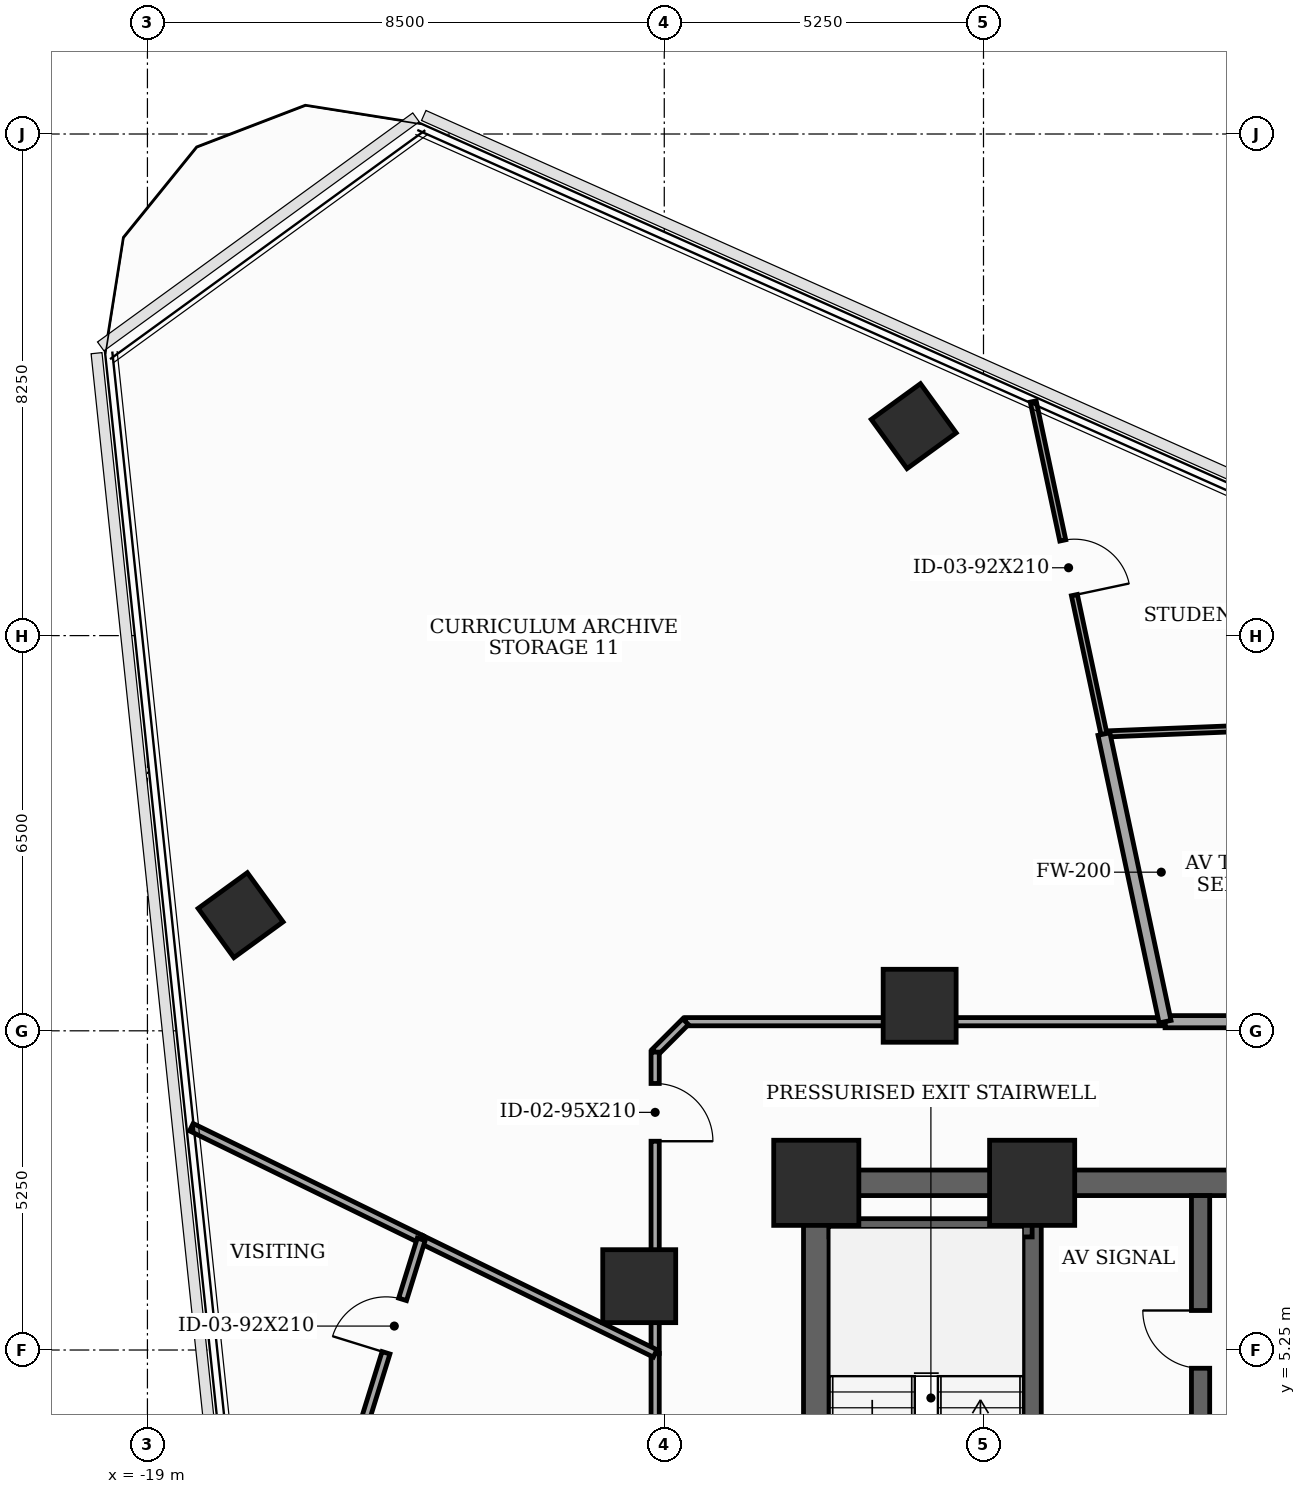
"""IFC4 building model, lengths in metres.
Left out: names, types, materials, properties, quantities, classifications, styles, units other than length and angle.
Written with IfcOpenShell. Run it as: python <this file> out.ifc"""

import sys

from ifc_helpers import new_model, si_unit, direction, frame, frame_2d, origin, origin_2d, place, context, subcontext, project, spatial, rectangle, extrude, element, fill, save


model = new_model("IFC4")
c1 = context("Model", 3, precision=1e-05, world=origin(), true_north=direction((0.0, 1.0)))
c2 = subcontext(c1, "Body", "Model", "MODEL_VIEW")
j1 = project(units=[si_unit("LENGTHUNIT", "METRE"), si_unit("PLANEANGLEUNIT", "RADIAN")], contexts=[c1])
p1 = place(None, origin())
s1 = spatial("IfcSite", under=j1, at=p1, CompositionType="ELEMENT")
p2 = place(p1, origin())
s2 = spatial("IfcBuilding", under=s1, at=p2, CompositionType="ELEMENT")
p3 = place(p2, frame((0.0, 0.0, 173.1)))
s3 = spatial("IfcBuildingStorey", under=s2, at=p3, CompositionType="ELEMENT", Elevation=173.1)
for number, where, z_axis, x_axis in (
    (1, (-4.45, 8.0, 0.0), (0.0, 0.0, 1.0), (1.0, 0.0, 0.0)),
    (2, (-8.0, 8.0, 0.0), (0.0, 0.0, 1.0), (1.0, 0.0, 0.0)),
):
    element("IfcColumn", number, at=place(p3, frame(where, z_axis=z_axis, x_axis=x_axis)), inside=s3, PredefinedType="COLUMN", context=c2, shape_type="SweptSolid", body=[
        extrude(rectangle(XDim=1.4, YDim=1.4, at=origin_2d()), origin(), (0.0, 0.0, 1.0), 3.7),
    ])
for number, where, z_axis, x_axis in (
    (3, (-6.3, 10.912, 0.0), (0.0, 0.0, 1.0), (1.0, 0.0, 0.0)),
    (4, (-10.912, 6.3, 0.0), (0.0, 0.0, 1.0), (1.0, 0.0, 0.0)),
):
    element("IfcColumn", number, at=place(p3, frame(where, z_axis=z_axis, x_axis=x_axis)), inside=s3, PredefinedType="COLUMN", context=c2, shape_type="SweptSolid", body=[
        extrude(rectangle(XDim=1.2, YDim=1.2, at=origin_2d()), origin(), (0.0, 0.0, 1.0), 3.7),
    ])
for number, where, z_axis, x_axis in (
    (5, (-6.397, 20.445, 0.0), (0.0, 0.0, 1.0), (0.809, 0.588, 0.0)),
    (6, (-17.468, 12.402, 0.0), (0.0, 0.0, 1.0), (0.809, 0.588, 0.0)),
):
    element("IfcColumn", number, at=place(p3, frame(where, z_axis=z_axis, x_axis=x_axis)), inside=s3, PredefinedType="COLUMN", context=c2, shape_type="SweptSolid", body=[
        extrude(rectangle(XDim=1.0, YDim=1.0, at=origin_2d()), origin(), (0.0, 0.0, 1.0), 3.7),
    ])
p4 = place(p3, frame((-8.0, -8.0, 0.0), z_axis=(0.0, 0.0, 1.0), x_axis=(0.0, 1.0, 0.0)))
e7 = element("IfcWall", 7, at=p4, inside=s3, PredefinedType="SHEAR", context=c2, shape_type="SweptSolid", body=[
    extrude(rectangle(XDim=16.0, YDim=0.42, at=frame_2d((8.0, 0.0))), origin(), (0.0, 0.0, 1.0), 3.5),
])
p5 = place(p4, frame((0.922, 0.0, 0.0)))
e8 = element("IfcOpeningElement", 8, at=p5, cuts=e7, PredefinedType="OPENING", context=c2, shape_type="SweptSolid", body=[
    extrude(rectangle(XDim=0.85, YDim=2.02, at=frame_2d((0.425, 1.01))), frame((0.0, 0.22, 0.0), z_axis=(0.0, -1.0, 0.0), x_axis=(1.0, 0.0, 0.0)), (0.0, 0.0, 1.0), 0.44),
])
p6 = place(p4, frame((5.35, 0.0, 0.0)))
e9 = element("IfcOpeningElement", 9, at=p6, cuts=e7, PredefinedType="OPENING", context=c2, shape_type="SweptSolid", body=[
    extrude(rectangle(XDim=1.05, YDim=2.15, at=frame_2d((0.525, 1.075))), frame((0.0, 0.22, 0.0), z_axis=(0.0, -1.0, 0.0), x_axis=(1.0, 0.0, 0.0)), (0.0, 0.0, 1.0), 0.44),
])
p7 = place(p3, frame((-8.0, 8.0, 0.0), z_axis=(0.0, 0.0, 1.0), x_axis=(1.0, 0.0, 0.0)))
e10 = element("IfcWall", 10, at=p7, inside=s3, PredefinedType="SHEAR", context=c2, shape_type="SweptSolid", body=[
    extrude(rectangle(XDim=16.0, YDim=0.42, at=frame_2d((8.0, 0.0))), origin(), (0.0, 0.0, 1.0), 3.5),
])
p8 = place(p7, frame((7.1, 0.0, 0.0)))
e11 = element("IfcOpeningElement", 11, at=p8, cuts=e10, PredefinedType="OPENING", context=c2, shape_type="SweptSolid", body=[
    extrude(rectangle(XDim=1.8, YDim=2.15, at=frame_2d((0.9, 1.075))), frame((0.0, 0.22, 0.0), z_axis=(0.0, -1.0, 0.0), x_axis=(1.0, 0.0, 0.0)), (0.0, 0.0, 1.0), 0.44),
])
p9 = place(p3, frame((-4.45, -7.79, 0.0), z_axis=(0.0, 0.0, 1.0), x_axis=(0.0, 1.0, 0.0)))
e12 = element("IfcWall", 12, at=p9, inside=s3, PredefinedType="SHEAR", context=c2, shape_type="SweptSolid", body=[
    extrude(rectangle(XDim=15.58, YDim=0.3, at=frame_2d((7.79, 0.0))), origin(), (0.0, 0.0, 1.0), 3.5),
])
p10 = place(p3, frame((-7.79, 7.26, 0.0), z_axis=(0.0, 0.0, 1.0), x_axis=(1.0, 0.0, 0.0)))
e13 = element("IfcWall", 13, at=p10, inside=s3, PredefinedType="SHEAR", context=c2, shape_type="SweptSolid", body=[
    extrude(rectangle(XDim=3.34, YDim=0.3, at=frame_2d((1.67, 0.0))), origin(), (0.0, 0.0, 1.0), 3.5),
])
p11 = place(p3, frame((-1.68, -4.85, 0.0), z_axis=(0.0, 0.0, 1.0), x_axis=(0.0, 1.0, 0.0)))
e14 = element("IfcWall", 14, at=p11, inside=s3, PredefinedType="SHEAR", context=c2, shape_type="SweptSolid", body=[
    extrude(rectangle(XDim=12.64, YDim=0.3, at=frame_2d((6.32, 0.0))), origin(), (0.0, 0.0, 1.0), 3.5),
])
p12 = place(p11, frame((3.5, 0.0, 0.0)))
e15 = element("IfcOpeningElement", 15, at=p12, cuts=e14, PredefinedType="OPENING", context=c2, shape_type="SweptSolid", body=[
    extrude(rectangle(XDim=0.95, YDim=2.1, at=frame_2d((0.475, 1.05))), frame((0.0, 0.16, 0.0), z_axis=(0.0, -1.0, 0.0), x_axis=(1.0, 0.0, 0.0)), (0.0, 0.0, 1.0), 0.32),
])
p13 = place(p11, frame((9.8, 0.0, 0.0)))
e16 = element("IfcOpeningElement", 16, at=p13, cuts=e14, PredefinedType="OPENING", context=c2, shape_type="SweptSolid", body=[
    extrude(rectangle(XDim=0.95, YDim=2.1, at=frame_2d((0.475, 1.05))), frame((0.0, 0.16, 0.0), z_axis=(0.0, -1.0, 0.0), x_axis=(1.0, 0.0, 0.0)), (0.0, 0.0, 1.0), 0.32),
])
p14 = place(p3, frame((10.15, 10.65, 0.0), z_axis=(0.0, 0.0, 1.0), x_axis=(-1.0, 0.0, 0.0)))
e17 = element("IfcWall", 17, at=p14, inside=s3, PredefinedType="SOLIDWALL", context=c2, shape_type="SweptSolid", body=[
    extrude(rectangle(XDim=12.414, YDim=0.2, at=frame_2d((6.207, 0.0))), origin(), (0.0, 0.0, 1.0), 2.875),
])
p15 = place(p14, frame((7.222, 0.0, 0.0)))
e18 = element("IfcOpeningElement", 18, at=p15, cuts=e17, PredefinedType="OPENING", context=c2, shape_type="SweptSolid", body=[
    extrude(rectangle(XDim=0.95, YDim=2.1, at=frame_2d((0.475, 1.05))), frame((0.0, 0.11, 0.0), z_axis=(0.0, -1.0, 0.0), x_axis=(1.0, 0.0, 0.0)), (0.0, 0.0, 1.0), 0.22),
])
p16 = place(p3, frame((-2.264, 10.65, 0.0), z_axis=(0.0, 0.0, 1.0), x_axis=(-1.0, 0.0, 0.0)))
e19 = element("IfcWall", 19, at=p16, inside=s3, PredefinedType="PARTITIONING", context=c2, shape_type="SweptSolid", body=[
    extrude(rectangle(XDim=7.886, YDim=0.135, at=frame_2d((3.943, 0.0))), origin(), (0.0, 0.0, 1.0), 2.885),
])
p17 = place(p3, frame((-10.15, 10.65, 0.0), z_axis=(0.0, 0.0, 1.0), x_axis=(-0.707106781187, -0.707106781187, 0.0)))
e20 = element("IfcWall", 20, at=p17, inside=s3, PredefinedType="PARTITIONING", context=c2, shape_type="SweptSolid", body=[
    extrude(rectangle(XDim=0.707, YDim=0.135, at=frame_2d((0.354, 0.0))), origin(), (0.0, 0.0, 1.0), 3.5),
])
p18 = place(p3, frame((-10.65, 10.15, 0.0), z_axis=(0.0, 0.0, 1.0), x_axis=(0.0, -1.0, 0.0)))
e21 = element("IfcWall", 21, at=p18, inside=s3, PredefinedType="PARTITIONING", context=c2, shape_type="SweptSolid", body=[
    extrude(rectangle(XDim=4.956, YDim=0.135, at=frame_2d((2.478, 0.0))), origin(), (0.0, 0.0, 1.0), 2.885),
])
p19 = place(p18, frame((0.516, 0.0, 0.0)))
e22 = element("IfcOpeningElement", 22, at=p19, cuts=e21, PredefinedType="OPENING", context=c2, shape_type="SweptSolid", body=[
    extrude(rectangle(XDim=0.95, YDim=2.1, at=frame_2d((0.475, 1.05))), frame((0.0, 0.077, 0.0), z_axis=(0.0, -1.0, 0.0), x_axis=(1.0, 0.0, 0.0)), (0.0, 0.0, 1.0), 0.155),
])
p20 = place(p3, frame((-10.65, 5.194, 0.0), z_axis=(0.0, 0.0, 1.0), x_axis=(0.0, -1.0, 0.0)))
e23 = element("IfcWall", 23, at=p20, inside=s3, PredefinedType="PARTITIONING", context=c2, shape_type="SweptSolid", body=[
    extrude(rectangle(XDim=2.744, YDim=0.135, at=frame_2d((1.372, 0.0))), origin(), (0.0, 0.0, 1.0), 3.5),
])
p21 = place(p20, frame((1.226, 0.0, 0.0)))
e24 = element("IfcOpeningElement", 24, at=p21, cuts=e23, PredefinedType="OPENING", context=c2, shape_type="SweptSolid", body=[
    extrude(rectangle(XDim=0.95, YDim=2.1, at=frame_2d((0.475, 1.05))), frame((0.0, 0.077, 0.0), z_axis=(0.0, -1.0, 0.0), x_axis=(1.0, 0.0, 0.0)), (0.0, 0.0, 1.0), 0.155),
])
p22 = place(p3, frame((-3.269, 15.381, 0.0), z_axis=(0.0, 0.0, 1.0), x_axis=(0.999171753478, 0.040691609114, 0.0)))
e25 = element("IfcWall", 25, at=p22, inside=s3, PredefinedType="MOVABLE", context=c2, shape_type="SweptSolid", body=[
    extrude(rectangle(XDim=5.7, YDim=0.1, at=frame_2d((2.85, 0.0))), origin(), (0.0, 0.0, 1.0), 2.885),
])
p23 = place(p3, frame((-4.432, 20.851, 0.0), z_axis=(0.0, 0.0, 1.0), x_axis=(0.208032106743, -0.978121997792, 0.0)))
e26 = element("IfcWall", 26, at=p23, inside=s3, PredefinedType="MOVABLE", context=c2, shape_type="SweptSolid", body=[
    extrude(rectangle(XDim=5.592, YDim=0.1, at=frame_2d((2.796, 0.0))), origin(), (0.0, 0.0, 1.0), 2.985),
])
p24 = place(p23, frame((2.336, 0.0, 0.0)))
e27 = element("IfcOpeningElement", 27, at=p24, cuts=e26, PredefinedType="OPENING", context=c2, shape_type="SweptSolid", body=[
    extrude(rectangle(XDim=0.92, YDim=2.1, at=frame_2d((0.46, 1.05))), frame((0.0, 0.06, 0.0), z_axis=(0.0, -1.0, 0.0), x_axis=(1.0, 0.0, 0.0)), (0.0, 0.0, 1.0), 0.12),
])
p25 = place(p3, frame((-3.269, 15.381, 0.0), z_axis=(0.0, 0.0, 1.0), x_axis=(0.207808649559, -0.978169497157, 0.0)))
e28 = element("IfcWall", 28, at=p25, inside=s3, PredefinedType="SOLIDWALL", context=c2, shape_type="SweptSolid", body=[
    extrude(rectangle(XDim=4.837, YDim=0.2, at=frame_2d((2.418, 0.0))), origin(), (0.0, 0.0, 1.0), 2.885),
])
p26 = place(p3, frame((-18.277, 8.915, 0.0), z_axis=(0.0, 0.0, 1.0), x_axis=(0.898795221882, -0.43836873648, 0.0)))
e29 = element("IfcWall", 29, at=p26, inside=s3, PredefinedType="PARTITIONING", context=c2, shape_type="SweptSolid", body=[
    extrude(rectangle(XDim=4.206, YDim=0.135, at=frame_2d((2.103, 0.0))), origin(), (0.0, 0.0, 1.0), 2.985),
])
p27 = place(p3, frame((-14.497, 7.071, 0.0), z_axis=(0.0, 0.0, 1.0), x_axis=(0.89874213328, -0.438477568261, 0.0)))
e30 = element("IfcWall", 30, at=p27, inside=s3, PredefinedType="PARTITIONING", context=c2, shape_type="SweptSolid", body=[
    extrude(rectangle(XDim=4.281, YDim=0.135, at=frame_2d((2.14, 0.0))), origin(), (0.0, 0.0, 1.0), 2.885),
])
p28 = place(p3, frame((-16.079, 1.974, 0.0), z_axis=(0.0, 0.0, 1.0), x_axis=(0.296438064518, 0.955052079158, 0.0)))
e31 = element("IfcWall", 31, at=p28, inside=s3, PredefinedType="PARTITIONING", context=c2, shape_type="SweptSolid", body=[
    extrude(rectangle(XDim=5.337, YDim=0.135, at=frame_2d((2.668, 0.0))), origin(), (0.0, 0.0, 1.0), 2.885),
])
p29 = place(p28, frame((3.383, 0.0, 0.0)))
e32 = element("IfcOpeningElement", 32, at=p29, cuts=e31, PredefinedType="OPENING", context=c2, shape_type="SweptSolid", body=[
    extrude(rectangle(XDim=0.92, YDim=2.1, at=frame_2d((0.46, 1.05))), frame((0.0, 0.077, 0.0), z_axis=(0.0, -1.0, 0.0), x_axis=(1.0, 0.0, 0.0)), (0.0, 0.0, 1.0), 0.155),
])
p30 = place(p13, origin())
e33 = element("IfcDoor", 33, at=p30, inside=s3, OperationType="SINGLE_SWING_RIGHT", PredefinedType="DOOR", context=c2, shape_type="SweptSolid", body=[
    extrude(rectangle(XDim=0.95, YDim=2.1, at=frame_2d((0.475, 1.05))), frame((0.0, 0.025, 0.0), z_axis=(0.0, -1.0, 0.0), x_axis=(1.0, 0.0, 0.0)), (0.0, 0.0, 1.0), 0.05),
])
fill(e16, e33)
p31 = place(p19, origin())
e34 = element("IfcDoor", 34, at=p31, inside=s3, OperationType="SINGLE_SWING_RIGHT", PredefinedType="DOOR", context=c2, shape_type="SweptSolid", body=[
    extrude(rectangle(XDim=0.95, YDim=2.1, at=frame_2d((0.475, 1.05))), frame((0.0, 0.025, 0.0), z_axis=(0.0, -1.0, 0.0), x_axis=(1.0, 0.0, 0.0)), (0.0, 0.0, 1.0), 0.05),
])
fill(e22, e34)
p32 = place(p24, origin())
e35 = element("IfcDoor", 35, at=p32, inside=s3, OperationType="SINGLE_SWING_RIGHT", PredefinedType="DOOR", context=c2, shape_type="SweptSolid", body=[
    extrude(rectangle(XDim=0.92, YDim=2.1, at=frame_2d((0.46, 1.05))), frame((0.0, 0.025, 0.0), z_axis=(0.0, -1.0, 0.0), x_axis=(1.0, 0.0, 0.0)), (0.0, 0.0, 1.0), 0.05),
])
fill(e27, e35)
p33 = place(p29, origin())
e36 = element("IfcDoor", 36, at=p33, inside=s3, OperationType="SINGLE_SWING_LEFT", PredefinedType="DOOR", context=c2, shape_type="SweptSolid", body=[
    extrude(rectangle(XDim=0.92, YDim=2.1, at=frame_2d((0.46, 1.05))), frame((0.0, 0.025, 0.0), z_axis=(0.0, -1.0, 0.0), x_axis=(1.0, 0.0, 0.0)), (0.0, 0.0, 1.0), 0.05),
])
fill(e32, e36)
save(model, sys.argv[1])
